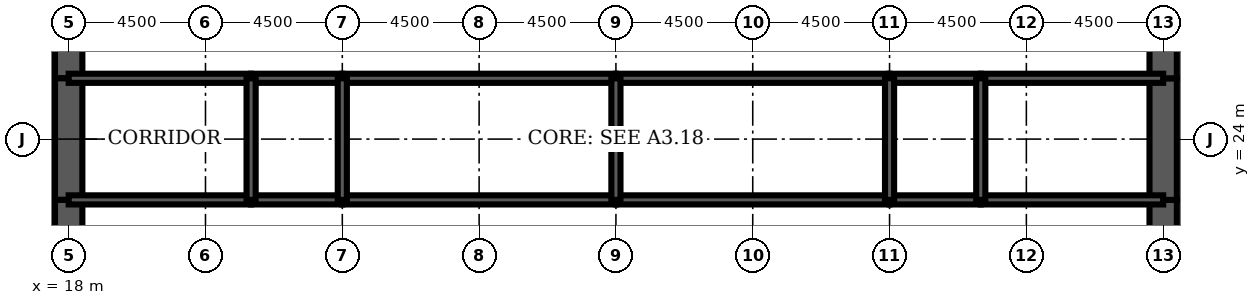
"""IFC4 building model, lengths in metres.
Left out: names, types, materials, properties, quantities, classifications, styles, units other than length and angle.
Written with IfcOpenShell. Run it as: python <this file> out.ifc"""

import sys

from ifc_helpers import new_model, si_unit, direction, frame, frame_2d, origin, place, context, subcontext, project, spatial, rectangle, extrude, element, fill, save


model = new_model("IFC4")
c1 = context("Model", 3, precision=1e-05, world=origin(), true_north=direction((0.0, 1.0)))
c2 = subcontext(c1, "Body", "Model", "MODEL_VIEW")
j1 = project(units=[si_unit("LENGTHUNIT", "METRE"), si_unit("PLANEANGLEUNIT", "RADIAN")], contexts=[c1])
p1 = place(None, origin())
s1 = spatial("IfcSite", under=j1, at=p1, CompositionType="ELEMENT")
p2 = place(p1, origin())
s2 = spatial("IfcBuilding", under=s1, at=p2, CompositionType="ELEMENT")
p3 = place(p2, frame((0.0, 0.0, 77.0)))
s3 = spatial("IfcBuildingStorey", under=s2, at=p3, CompositionType="ELEMENT", Elevation=77.0)
p4 = place(p3, frame((18.0, 28.8, 0.0), z_axis=(0.0, 0.0, 1.0), x_axis=(0.0, -1.0, 0.0)))
e1 = element("IfcWall", 1, at=p4, inside=s3, PredefinedType="SHEAR", context=c2, shape_type="SweptSolid", body=[
    extrude(rectangle(XDim=2.8, YDim=0.9, at=frame_2d((1.4, 0.0))), origin(), (0.0, 0.0, 1.0), 4.5),
])
p5 = place(p4, frame((0.4, 0.0, 0.0)))
e2 = element("IfcOpeningElement", 2, at=p5, cuts=e1, PredefinedType="OPENING", context=c2, shape_type="SweptSolid", body=[
    extrude(rectangle(XDim=1.8, YDim=2.1, at=frame_2d((0.9, 1.05))), frame((0.0, 0.46, 0.0), z_axis=(0.0, -1.0, 0.0), x_axis=(1.0, 0.0, 0.0)), (0.0, 0.0, 1.0), 0.92),
])
p6 = place(p3, frame((18.0, 26.0, 0.0), z_axis=(0.0, 0.0, 1.0), x_axis=(0.0, -1.0, 0.0)))
e3 = element("IfcWall", 3, at=p6, inside=s3, PredefinedType="SHEAR", context=c2, shape_type="SweptSolid", body=[
    extrude(rectangle(XDim=4.0, YDim=0.9, at=frame_2d((2.0, 0.0))), origin(), (0.0, 0.0, 1.0), 4.5),
])
p7 = place(p3, frame((18.0, 22.0, 0.0), z_axis=(0.0, 0.0, 1.0), x_axis=(0.0, -1.0, 0.0)))
e4 = element("IfcWall", 4, at=p7, inside=s3, PredefinedType="SHEAR", context=c2, shape_type="SweptSolid", body=[
    extrude(rectangle(XDim=2.8, YDim=0.9, at=frame_2d((1.4, 0.0))), origin(), (0.0, 0.0, 1.0), 4.5),
])
p8 = place(p7, frame((0.6, 0.0, 0.0)))
e5 = element("IfcOpeningElement", 5, at=p8, cuts=e4, PredefinedType="OPENING", context=c2, shape_type="SweptSolid", body=[
    extrude(rectangle(XDim=1.8, YDim=2.1, at=frame_2d((0.9, 1.05))), frame((0.0, 0.46, 0.0), z_axis=(0.0, -1.0, 0.0), x_axis=(1.0, 0.0, 0.0)), (0.0, 0.0, 1.0), 0.92),
])
p9 = place(p3, frame((54.0, 19.2, 0.0), z_axis=(0.0, 0.0, 1.0), x_axis=(0.0, 1.0, 0.0)))
e6 = element("IfcWall", 6, at=p9, inside=s3, PredefinedType="SHEAR", context=c2, shape_type="SweptSolid", body=[
    extrude(rectangle(XDim=2.8, YDim=0.9, at=frame_2d((1.4, 0.0))), origin(), (0.0, 0.0, 1.0), 4.5),
])
p10 = place(p9, frame((0.4, 0.0, 0.0)))
e7 = element("IfcOpeningElement", 7, at=p10, cuts=e6, PredefinedType="OPENING", context=c2, shape_type="SweptSolid", body=[
    extrude(rectangle(XDim=1.8, YDim=2.1, at=frame_2d((0.9, 1.05))), frame((0.0, 0.46, 0.0), z_axis=(0.0, -1.0, 0.0), x_axis=(1.0, 0.0, 0.0)), (0.0, 0.0, 1.0), 0.92),
])
p11 = place(p3, frame((54.0, 22.0, 0.0), z_axis=(0.0, 0.0, 1.0), x_axis=(0.0, 1.0, 0.0)))
e8 = element("IfcWall", 8, at=p11, inside=s3, PredefinedType="SHEAR", context=c2, shape_type="SweptSolid", body=[
    extrude(rectangle(XDim=4.0, YDim=0.9, at=frame_2d((2.0, 0.0))), origin(), (0.0, 0.0, 1.0), 4.5),
])
p12 = place(p3, frame((54.0, 26.0, 0.0), z_axis=(0.0, 0.0, 1.0), x_axis=(0.0, 1.0, 0.0)))
e9 = element("IfcWall", 9, at=p12, inside=s3, PredefinedType="SHEAR", context=c2, shape_type="SweptSolid", body=[
    extrude(rectangle(XDim=2.8, YDim=0.9, at=frame_2d((1.4, 0.0))), origin(), (0.0, 0.0, 1.0), 4.5),
])
p13 = place(p12, frame((0.6, 0.0, 0.0)))
e10 = element("IfcOpeningElement", 10, at=p13, cuts=e9, PredefinedType="OPENING", context=c2, shape_type="SweptSolid", body=[
    extrude(rectangle(XDim=1.8, YDim=2.1, at=frame_2d((0.9, 1.05))), frame((0.0, 0.46, 0.0), z_axis=(0.0, -1.0, 0.0), x_axis=(1.0, 0.0, 0.0)), (0.0, 0.0, 1.0), 0.92),
])
p14 = place(p3, frame((18.0, 22.0, 0.0), z_axis=(0.0, 0.0, 1.0), x_axis=(1.0, 0.0, 0.0)))
e11 = element("IfcWall", 11, at=p14, inside=s3, PredefinedType="SOLIDWALL", context=c2, shape_type="SweptSolid", body=[
    extrude(rectangle(XDim=6.0, YDim=0.3, at=frame_2d((3.0, 0.0))), origin(), (0.0, 0.0, 1.0), 4.5),
])
p15 = place(p14, frame((2.0, 0.0, 0.0)))
e12 = element("IfcOpeningElement", 12, at=p15, cuts=e11, PredefinedType="OPENING", context=c2, shape_type="SweptSolid", body=[
    extrude(rectangle(XDim=1.0, YDim=2.1, at=frame_2d((0.5, 1.05))), frame((0.0, 0.16, 0.0), z_axis=(0.0, -1.0, 0.0), x_axis=(1.0, 0.0, 0.0)), (0.0, 0.0, 1.0), 0.32),
])
p16 = place(p3, frame((24.0, 22.0, 0.0), z_axis=(0.0, 0.0, 1.0), x_axis=(1.0, 0.0, 0.0)))
e13 = element("IfcWall", 13, at=p16, inside=s3, PredefinedType="SOLIDWALL", context=c2, shape_type="SweptSolid", body=[
    extrude(rectangle(XDim=3.0, YDim=0.3, at=frame_2d((1.5, 0.0))), origin(), (0.0, 0.0, 1.0), 4.5),
])
p17 = place(p16, frame((1.0, 0.0, 0.0)))
e14 = element("IfcOpeningElement", 14, at=p17, cuts=e13, PredefinedType="OPENING", context=c2, shape_type="SweptSolid", body=[
    extrude(rectangle(XDim=1.0, YDim=2.1, at=frame_2d((0.5, 1.05))), frame((0.0, 0.16, 0.0), z_axis=(0.0, -1.0, 0.0), x_axis=(1.0, 0.0, 0.0)), (0.0, 0.0, 1.0), 0.32),
])
p18 = place(p3, frame((27.0, 22.0, 0.0), z_axis=(0.0, 0.0, 1.0), x_axis=(1.0, 0.0, 0.0)))
e15 = element("IfcWall", 15, at=p18, inside=s3, PredefinedType="SOLIDWALL", context=c2, shape_type="SweptSolid", body=[
    extrude(rectangle(XDim=9.0, YDim=0.3, at=frame_2d((4.5, 0.0))), origin(), (0.0, 0.0, 1.0), 4.5),
])
p19 = place(p18, frame((4.0, 0.0, 0.0)))
e16 = element("IfcOpeningElement", 16, at=p19, cuts=e15, PredefinedType="OPENING", context=c2, shape_type="SweptSolid", body=[
    extrude(rectangle(XDim=1.0, YDim=2.1, at=frame_2d((0.5, 1.05))), frame((0.0, 0.16, 0.0), z_axis=(0.0, -1.0, 0.0), x_axis=(1.0, 0.0, 0.0)), (0.0, 0.0, 1.0), 0.32),
])
p20 = place(p3, frame((36.0, 22.0, 0.0), z_axis=(0.0, 0.0, 1.0), x_axis=(1.0, 0.0, 0.0)))
e17 = element("IfcWall", 17, at=p20, inside=s3, PredefinedType="SOLIDWALL", context=c2, shape_type="SweptSolid", body=[
    extrude(rectangle(XDim=9.0, YDim=0.3, at=frame_2d((4.5, 0.0))), origin(), (0.0, 0.0, 1.0), 4.5),
])
p21 = place(p20, frame((4.0, 0.0, 0.0)))
e18 = element("IfcOpeningElement", 18, at=p21, cuts=e17, PredefinedType="OPENING", context=c2, shape_type="SweptSolid", body=[
    extrude(rectangle(XDim=1.0, YDim=2.1, at=frame_2d((0.5, 1.05))), frame((0.0, 0.16, 0.0), z_axis=(0.0, -1.0, 0.0), x_axis=(1.0, 0.0, 0.0)), (0.0, 0.0, 1.0), 0.32),
])
p22 = place(p3, frame((45.0, 22.0, 0.0), z_axis=(0.0, 0.0, 1.0), x_axis=(1.0, 0.0, 0.0)))
e19 = element("IfcWall", 19, at=p22, inside=s3, PredefinedType="SOLIDWALL", context=c2, shape_type="SweptSolid", body=[
    extrude(rectangle(XDim=3.0, YDim=0.3, at=frame_2d((1.5, 0.0))), origin(), (0.0, 0.0, 1.0), 4.5),
])
p23 = place(p22, frame((1.0, 0.0, 0.0)))
e20 = element("IfcOpeningElement", 20, at=p23, cuts=e19, PredefinedType="OPENING", context=c2, shape_type="SweptSolid", body=[
    extrude(rectangle(XDim=1.0, YDim=2.1, at=frame_2d((0.5, 1.05))), frame((0.0, 0.16, 0.0), z_axis=(0.0, -1.0, 0.0), x_axis=(1.0, 0.0, 0.0)), (0.0, 0.0, 1.0), 0.32),
])
p24 = place(p3, frame((48.0, 22.0, 0.0), z_axis=(0.0, 0.0, 1.0), x_axis=(1.0, 0.0, 0.0)))
e21 = element("IfcWall", 21, at=p24, inside=s3, PredefinedType="SOLIDWALL", context=c2, shape_type="SweptSolid", body=[
    extrude(rectangle(XDim=6.0, YDim=0.3, at=frame_2d((3.0, 0.0))), origin(), (0.0, 0.0, 1.0), 4.5),
])
p25 = place(p24, frame((2.0, 0.0, 0.0)))
e22 = element("IfcOpeningElement", 22, at=p25, cuts=e21, PredefinedType="OPENING", context=c2, shape_type="SweptSolid", body=[
    extrude(rectangle(XDim=1.0, YDim=2.1, at=frame_2d((0.5, 1.05))), frame((0.0, 0.16, 0.0), z_axis=(0.0, -1.0, 0.0), x_axis=(1.0, 0.0, 0.0)), (0.0, 0.0, 1.0), 0.32),
])
p26 = place(p24, frame((4.3, 0.0, 0.0)))
e23 = element("IfcOpeningElement", 23, at=p26, cuts=e21, PredefinedType="OPENING", context=c2, shape_type="SweptSolid", body=[
    extrude(rectangle(XDim=1.0, YDim=2.1, at=frame_2d((0.5, 1.05))), frame((0.0, 0.16, 0.0), z_axis=(0.0, -1.0, 0.0), x_axis=(1.0, 0.0, 0.0)), (0.0, 0.0, 1.0), 0.32),
])
p27 = place(p3, frame((18.0, 26.0, 0.0), z_axis=(0.0, 0.0, 1.0), x_axis=(1.0, 0.0, 0.0)))
e24 = element("IfcWall", 24, at=p27, inside=s3, PredefinedType="SOLIDWALL", context=c2, shape_type="SweptSolid", body=[
    extrude(rectangle(XDim=6.0, YDim=0.3, at=frame_2d((3.0, 0.0))), origin(), (0.0, 0.0, 1.0), 4.5),
])
p28 = place(p3, frame((24.0, 26.0, 0.0), z_axis=(0.0, 0.0, 1.0), x_axis=(1.0, 0.0, 0.0)))
e25 = element("IfcWall", 25, at=p28, inside=s3, PredefinedType="SOLIDWALL", context=c2, shape_type="SweptSolid", body=[
    extrude(rectangle(XDim=3.0, YDim=0.3, at=frame_2d((1.5, 0.0))), origin(), (0.0, 0.0, 1.0), 4.5),
])
for number, where, z_axis, x_axis in (
    (26, (27.0, 26.0, 0.0), (0.0, 0.0, 1.0), (1.0, 0.0, 0.0)),
    (27, (36.0, 26.0, 0.0), (0.0, 0.0, 1.0), (1.0, 0.0, 0.0)),
):
    element("IfcWall", number, at=place(p3, frame(where, z_axis=z_axis, x_axis=x_axis)), inside=s3, PredefinedType="SOLIDWALL", context=c2, shape_type="SweptSolid", body=[
        extrude(rectangle(XDim=9.0, YDim=0.3, at=frame_2d((4.5, 0.0))), origin(), (0.0, 0.0, 1.0), 4.5),
    ])
p29 = place(p3, frame((45.0, 26.0, 0.0), z_axis=(0.0, 0.0, 1.0), x_axis=(1.0, 0.0, 0.0)))
e28 = element("IfcWall", 28, at=p29, inside=s3, PredefinedType="SOLIDWALL", context=c2, shape_type="SweptSolid", body=[
    extrude(rectangle(XDim=3.0, YDim=0.3, at=frame_2d((1.5, 0.0))), origin(), (0.0, 0.0, 1.0), 4.5),
])
p30 = place(p3, frame((48.0, 26.0, 0.0), z_axis=(0.0, 0.0, 1.0), x_axis=(1.0, 0.0, 0.0)))
e29 = element("IfcWall", 29, at=p30, inside=s3, PredefinedType="SOLIDWALL", context=c2, shape_type="SweptSolid", body=[
    extrude(rectangle(XDim=6.0, YDim=0.3, at=frame_2d((3.0, 0.0))), origin(), (0.0, 0.0, 1.0), 4.5),
])
for number, where, z_axis, x_axis in (
    (30, (24.0, 22.0, 0.0), (0.0, 0.0, 1.0), (0.0, 1.0, 0.0)),
    (31, (27.0, 22.0, 0.0), (0.0, 0.0, 1.0), (0.0, 1.0, 0.0)),
    (32, (36.0, 22.0, 0.0), (0.0, 0.0, 1.0), (0.0, 1.0, 0.0)),
    (33, (45.0, 22.0, 0.0), (0.0, 0.0, 1.0), (0.0, 1.0, 0.0)),
    (34, (48.0, 22.0, 0.0), (0.0, 0.0, 1.0), (0.0, 1.0, 0.0)),
):
    element("IfcWall", number, at=place(p3, frame(where, z_axis=z_axis, x_axis=x_axis)), inside=s3, PredefinedType="SOLIDWALL", context=c2, shape_type="SweptSolid", body=[
        extrude(rectangle(XDim=4.0, YDim=0.3, at=frame_2d((2.0, 0.0))), origin(), (0.0, 0.0, 1.0), 4.5),
    ])
p31 = place(p3, frame((38.0, 22.15, 0.0), z_axis=(0.0, 0.0, 1.0), x_axis=(0.0, 1.0, 0.0)))
e35 = element("IfcWall", 35, at=p31, inside=s3, PredefinedType="PARTITIONING", context=c2, shape_type="SweptSolid", body=[
    extrude(rectangle(XDim=3.7, YDim=0.15, at=frame_2d((1.85, 0.0))), origin(), (0.0, 0.0, 1.0), 3.0),
])
p32 = place(p31, frame((2.2, 0.0, 0.0)))
e36 = element("IfcOpeningElement", 36, at=p32, cuts=e35, PredefinedType="OPENING", context=c2, shape_type="SweptSolid", body=[
    extrude(rectangle(XDim=1.0, YDim=2.1, at=frame_2d((0.5, 1.05))), frame((0.0, 0.085, 0.0), z_axis=(0.0, -1.0, 0.0), x_axis=(1.0, 0.0, 0.0)), (0.0, 0.0, 1.0), 0.17),
])
p33 = place(p3, frame((51.975, 22.15, 0.0), z_axis=(0.0, 0.0, 1.0), x_axis=(0.0, 1.0, 0.0)))
e37 = element("IfcWall", 37, at=p33, inside=s3, PredefinedType="PARTITIONING", context=c2, shape_type="SweptSolid", body=[
    extrude(rectangle(XDim=3.7, YDim=0.15, at=frame_2d((1.85, 0.0))), origin(), (0.0, 0.0, 1.0), 3.0),
])
p34 = place(p32, origin())
e38 = element("IfcDoor", 38, at=p34, inside=s3, OperationType="SINGLE_SWING_RIGHT", PredefinedType="DOOR", context=c2, shape_type="SweptSolid", body=[
    extrude(rectangle(XDim=1.0, YDim=2.1, at=frame_2d((0.5, 1.05))), frame((0.0, 0.025, 0.0), z_axis=(0.0, -1.0, 0.0), x_axis=(1.0, 0.0, 0.0)), (0.0, 0.0, 1.0), 0.05),
])
fill(e36, e38)
p35 = place(p8, origin())
e39 = element("IfcDoor", 39, at=p35, inside=s3, OperationType="SINGLE_SWING_LEFT", PredefinedType="DOOR", context=c2, shape_type="SweptSolid", body=[
    extrude(rectangle(XDim=1.8, YDim=2.1, at=frame_2d((0.9, 1.05))), frame((0.0, 0.45, 0.0), z_axis=(0.0, -1.0, 0.0), x_axis=(1.0, 0.0, 0.0)), (0.0, 0.0, 1.0), 0.899),
])
fill(e5, e39)
p36 = place(p5, origin())
e40 = element("IfcDoor", 40, at=p36, inside=s3, OperationType="SINGLE_SWING_LEFT", PredefinedType="DOOR", context=c2, shape_type="SweptSolid", body=[
    extrude(rectangle(XDim=1.8, YDim=2.1, at=frame_2d((0.9, 1.05))), frame((0.0, 0.45, 0.0), z_axis=(0.0, -1.0, 0.0), x_axis=(1.0, 0.0, 0.0)), (0.0, 0.0, 1.0), 0.899),
])
fill(e2, e40)
p37 = place(p10, origin())
e41 = element("IfcDoor", 41, at=p37, inside=s3, OperationType="SINGLE_SWING_LEFT", PredefinedType="DOOR", context=c2, shape_type="SweptSolid", body=[
    extrude(rectangle(XDim=1.8, YDim=2.1, at=frame_2d((0.9, 1.05))), frame((0.0, 0.45, 0.0), z_axis=(0.0, -1.0, 0.0), x_axis=(1.0, 0.0, 0.0)), (0.0, 0.0, 1.0), 0.899),
])
fill(e7, e41)
p38 = place(p13, origin())
e42 = element("IfcDoor", 42, at=p38, inside=s3, OperationType="SINGLE_SWING_LEFT", PredefinedType="DOOR", context=c2, shape_type="SweptSolid", body=[
    extrude(rectangle(XDim=1.8, YDim=2.1, at=frame_2d((0.9, 1.05))), frame((0.0, 0.45, 0.0), z_axis=(0.0, -1.0, 0.0), x_axis=(1.0, 0.0, 0.0)), (0.0, 0.0, 1.0), 0.899),
])
fill(e10, e42)
p39 = place(p15, origin())
e43 = element("IfcDoor", 43, at=p39, inside=s3, OperationType="SINGLE_SWING_LEFT", PredefinedType="DOOR", context=c2, shape_type="SweptSolid", body=[
    extrude(rectangle(XDim=1.0, YDim=2.1, at=frame_2d((0.5, 1.05))), frame((0.0, 0.025, 0.0), z_axis=(0.0, -1.0, 0.0), x_axis=(1.0, 0.0, 0.0)), (0.0, 0.0, 1.0), 0.05),
])
fill(e12, e43)
p40 = place(p17, origin())
e44 = element("IfcDoor", 44, at=p40, inside=s3, OperationType="SINGLE_SWING_LEFT", PredefinedType="DOOR", context=c2, shape_type="SweptSolid", body=[
    extrude(rectangle(XDim=1.0, YDim=2.1, at=frame_2d((0.5, 1.05))), frame((0.0, 0.025, 0.0), z_axis=(0.0, -1.0, 0.0), x_axis=(1.0, 0.0, 0.0)), (0.0, 0.0, 1.0), 0.05),
])
fill(e14, e44)
p41 = place(p19, origin())
e45 = element("IfcDoor", 45, at=p41, inside=s3, OperationType="SINGLE_SWING_LEFT", PredefinedType="DOOR", context=c2, shape_type="SweptSolid", body=[
    extrude(rectangle(XDim=1.0, YDim=2.1, at=frame_2d((0.5, 1.05))), frame((0.0, 0.025, 0.0), z_axis=(0.0, -1.0, 0.0), x_axis=(1.0, 0.0, 0.0)), (0.0, 0.0, 1.0), 0.05),
])
fill(e16, e45)
p42 = place(p21, origin())
e46 = element("IfcDoor", 46, at=p42, inside=s3, OperationType="SINGLE_SWING_LEFT", PredefinedType="DOOR", context=c2, shape_type="SweptSolid", body=[
    extrude(rectangle(XDim=1.0, YDim=2.1, at=frame_2d((0.5, 1.05))), frame((0.0, 0.025, 0.0), z_axis=(0.0, -1.0, 0.0), x_axis=(1.0, 0.0, 0.0)), (0.0, 0.0, 1.0), 0.05),
])
fill(e18, e46)
p43 = place(p23, origin())
e47 = element("IfcDoor", 47, at=p43, inside=s3, OperationType="SINGLE_SWING_LEFT", PredefinedType="DOOR", context=c2, shape_type="SweptSolid", body=[
    extrude(rectangle(XDim=1.0, YDim=2.1, at=frame_2d((0.5, 1.05))), frame((0.0, 0.025, 0.0), z_axis=(0.0, -1.0, 0.0), x_axis=(1.0, 0.0, 0.0)), (0.0, 0.0, 1.0), 0.05),
])
fill(e20, e47)
p44 = place(p25, origin())
e48 = element("IfcDoor", 48, at=p44, inside=s3, OperationType="SINGLE_SWING_LEFT", PredefinedType="DOOR", context=c2, shape_type="SweptSolid", body=[
    extrude(rectangle(XDim=1.0, YDim=2.1, at=frame_2d((0.5, 1.05))), frame((0.0, 0.025, 0.0), z_axis=(0.0, -1.0, 0.0), x_axis=(1.0, 0.0, 0.0)), (0.0, 0.0, 1.0), 0.05),
])
fill(e22, e48)
p45 = place(p26, origin())
e49 = element("IfcDoor", 49, at=p45, inside=s3, OperationType="SINGLE_SWING_RIGHT", PredefinedType="DOOR", context=c2, shape_type="SweptSolid", body=[
    extrude(rectangle(XDim=1.0, YDim=2.1, at=frame_2d((0.5, 1.05))), frame((0.0, 0.025, 0.0), z_axis=(0.0, -1.0, 0.0), x_axis=(1.0, 0.0, 0.0)), (0.0, 0.0, 1.0), 0.05),
])
fill(e23, e49)
save(model, sys.argv[1])
